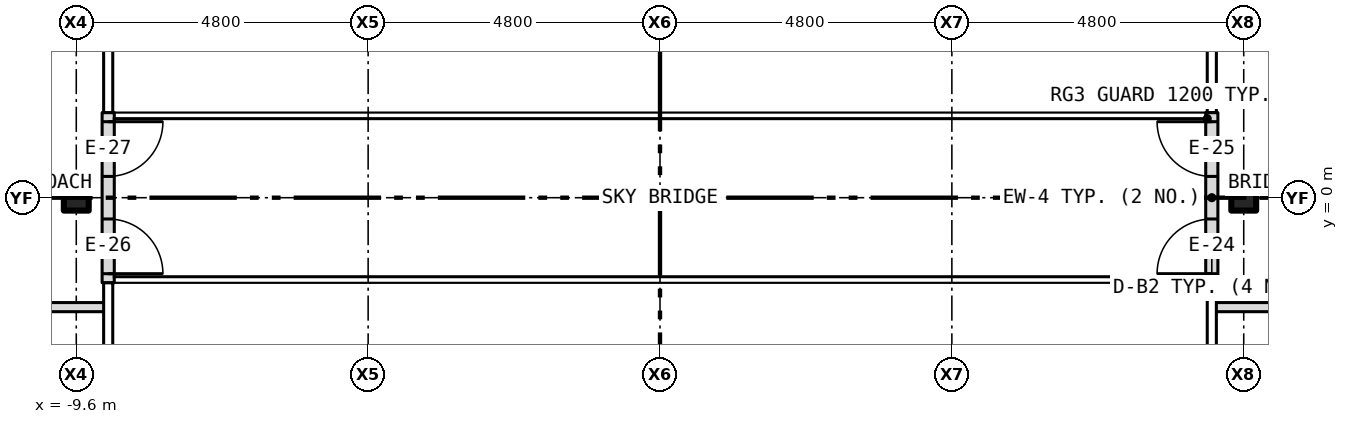
"""IFC4 building model, lengths in metres.
Left out: names, types, materials, properties, quantities, classifications, styles, units other than length and angle.
Written with IfcOpenShell. Run it as: python <this file> out.ifc"""

import sys

from ifc_helpers import new_model, si_unit, direction, frame, frame_2d, origin, origin_2d, place, context, subcontext, project, spatial, rectangle, i_section, extrude, element, fill, save


model = new_model("IFC4")
c1 = context("Model", 3, precision=1e-05, world=origin(), true_north=direction((0.0, 1.0)))
c2 = subcontext(c1, "Body", "Model", "MODEL_VIEW")
j1 = project(units=[si_unit("LENGTHUNIT", "METRE"), si_unit("PLANEANGLEUNIT", "RADIAN")], contexts=[c1])
p1 = place(None, origin())
s1 = spatial("IfcSite", under=j1, at=p1, CompositionType="ELEMENT")
p2 = place(p1, origin())
s2 = spatial("IfcBuilding", under=s1, at=p2, CompositionType="ELEMENT")
p3 = place(p2, frame((0.0, 0.0, 67.0)))
s3 = spatial("IfcBuildingStorey", under=s2, at=p3, CompositionType="ELEMENT", Elevation=67.0)
for number, where, z_axis, x_axis in (
    (1, (-9.6, 0.0, -0.15), (0.0, 0.0, 1.0), (1.0, 0.0, 0.0)),
    (2, (9.6, 0.0, -0.15), (0.0, 0.0, 1.0), (1.0, 0.0, 0.0)),
):
    element("IfcColumn", number, at=place(p3, frame(where, z_axis=z_axis, x_axis=x_axis)), inside=s3, PredefinedType="COLUMN", context=c2, shape_type="SweptSolid", body=[
        extrude(i_section(OverallWidth=0.409, OverallDepth=0.424, WebThickness=0.033, FlangeThickness=0.052, at=origin_2d()), origin(), (0.0, 0.0, 1.0), 3.5),
    ])
p4 = place(p3, frame((9.075, -1.4, 0.0), z_axis=(0.0, 0.0, 1.0), x_axis=(0.0, 1.0, 0.0)))
e3 = element("IfcWall", 3, at=p4, inside=s3, PredefinedType="SOLIDWALL", context=c2, shape_type="SweptSolid", body=[
    extrude(rectangle(XDim=2.8, YDim=0.2, at=frame_2d((1.4, 0.0))), origin(), (0.0, 0.0, 1.0), 3.5),
])
p5 = place(p4, frame((0.15, 0.0, 0.0)))
e4 = element("IfcOpeningElement", 4, at=p5, cuts=e3, PredefinedType="OPENING", context=c2, shape_type="SweptSolid", body=[
    extrude(rectangle(XDim=0.9, YDim=2.1, at=frame_2d((0.45, 1.05))), frame((0.0, 0.112, 0.0), z_axis=(0.0, -1.0, 0.0), x_axis=(1.0, 0.0, 0.0)), (0.0, 0.0, 1.0), 0.224),
])
p6 = place(p4, frame((1.75, 0.0, 0.0)))
e5 = element("IfcOpeningElement", 5, at=p6, cuts=e3, PredefinedType="OPENING", context=c2, shape_type="SweptSolid", body=[
    extrude(rectangle(XDim=0.9, YDim=2.1, at=frame_2d((0.45, 1.05))), frame((0.0, 0.112, 0.0), z_axis=(0.0, -1.0, 0.0), x_axis=(1.0, 0.0, 0.0)), (0.0, 0.0, 1.0), 0.224),
])
p7 = place(p3, frame((-9.075, -1.4, 0.0), z_axis=(0.0, 0.0, 1.0), x_axis=(0.0, 1.0, 0.0)))
e6 = element("IfcWall", 6, at=p7, inside=s3, PredefinedType="SOLIDWALL", context=c2, shape_type="SweptSolid", body=[
    extrude(rectangle(XDim=2.8, YDim=0.2, at=frame_2d((1.4, 0.0))), origin(), (0.0, 0.0, 1.0), 3.5),
])
p8 = place(p7, frame((0.15, 0.0, 0.0)))
e7 = element("IfcOpeningElement", 7, at=p8, cuts=e6, PredefinedType="OPENING", context=c2, shape_type="SweptSolid", body=[
    extrude(rectangle(XDim=0.9, YDim=2.1, at=frame_2d((0.45, 1.05))), frame((0.0, 0.112, 0.0), z_axis=(0.0, -1.0, 0.0), x_axis=(1.0, 0.0, 0.0)), (0.0, 0.0, 1.0), 0.224),
])
p9 = place(p7, frame((1.75, 0.0, 0.0)))
e8 = element("IfcOpeningElement", 8, at=p9, cuts=e6, PredefinedType="OPENING", context=c2, shape_type="SweptSolid", body=[
    extrude(rectangle(XDim=0.9, YDim=2.1, at=frame_2d((0.45, 1.05))), frame((0.0, 0.112, 0.0), z_axis=(0.0, -1.0, 0.0), x_axis=(1.0, 0.0, 0.0)), (0.0, 0.0, 1.0), 0.224),
])
for number, where, z_axis, x_axis in (
    (9, (-12.4, -1.8, 0.0), (0.0, 0.0, 1.0), (1.0, 0.0, 0.0)),
    (10, (9.12, -1.8, 0.0), (0.0, 0.0, 1.0), (1.0, 0.0, 0.0)),
):
    element("IfcWall", number, at=place(p3, frame(where, z_axis=z_axis, x_axis=x_axis)), inside=s3, PredefinedType="PARTITIONING", context=c2, shape_type="SweptSolid", body=[
        extrude(rectangle(XDim=3.28, YDim=0.15, at=frame_2d((1.64, 0.0))), origin(), (0.0, 0.0, 1.0), 3.35),
    ])
p10 = place(p5, origin())
e11 = element("IfcDoor", 11, at=p10, inside=s3, OperationType="SINGLE_SWING_LEFT", PredefinedType="DOOR", context=c2, shape_type="SweptSolid", body=[
    extrude(rectangle(XDim=0.9, YDim=2.1, at=frame_2d((0.45, 1.05))), frame((0.0, 0.025, 0.0), z_axis=(0.0, -1.0, 0.0), x_axis=(1.0, 0.0, 0.0)), (0.0, 0.0, 1.0), 0.05),
])
fill(e4, e11)
p11 = place(p6, origin())
e12 = element("IfcDoor", 12, at=p11, inside=s3, OperationType="SINGLE_SWING_RIGHT", PredefinedType="DOOR", context=c2, shape_type="SweptSolid", body=[
    extrude(rectangle(XDim=0.9, YDim=2.1, at=frame_2d((0.45, 1.05))), frame((0.0, 0.025, 0.0), z_axis=(0.0, -1.0, 0.0), x_axis=(1.0, 0.0, 0.0)), (0.0, 0.0, 1.0), 0.05),
])
fill(e5, e12)
p12 = place(p8, origin())
e13 = element("IfcDoor", 13, at=p12, inside=s3, OperationType="SINGLE_SWING_LEFT", PredefinedType="DOOR", context=c2, shape_type="SweptSolid", body=[
    extrude(rectangle(XDim=0.9, YDim=2.1, at=frame_2d((0.45, 1.05))), frame((0.0, 0.025, 0.0), z_axis=(0.0, -1.0, 0.0), x_axis=(1.0, 0.0, 0.0)), (0.0, 0.0, 1.0), 0.05),
])
fill(e7, e13)
p13 = place(p9, origin())
e14 = element("IfcDoor", 14, at=p13, inside=s3, OperationType="SINGLE_SWING_RIGHT", PredefinedType="DOOR", context=c2, shape_type="SweptSolid", body=[
    extrude(rectangle(XDim=0.9, YDim=2.1, at=frame_2d((0.45, 1.05))), frame((0.0, 0.025, 0.0), z_axis=(0.0, -1.0, 0.0), x_axis=(1.0, 0.0, 0.0)), (0.0, 0.0, 1.0), 0.05),
])
fill(e8, e14)
save(model, sys.argv[1])
